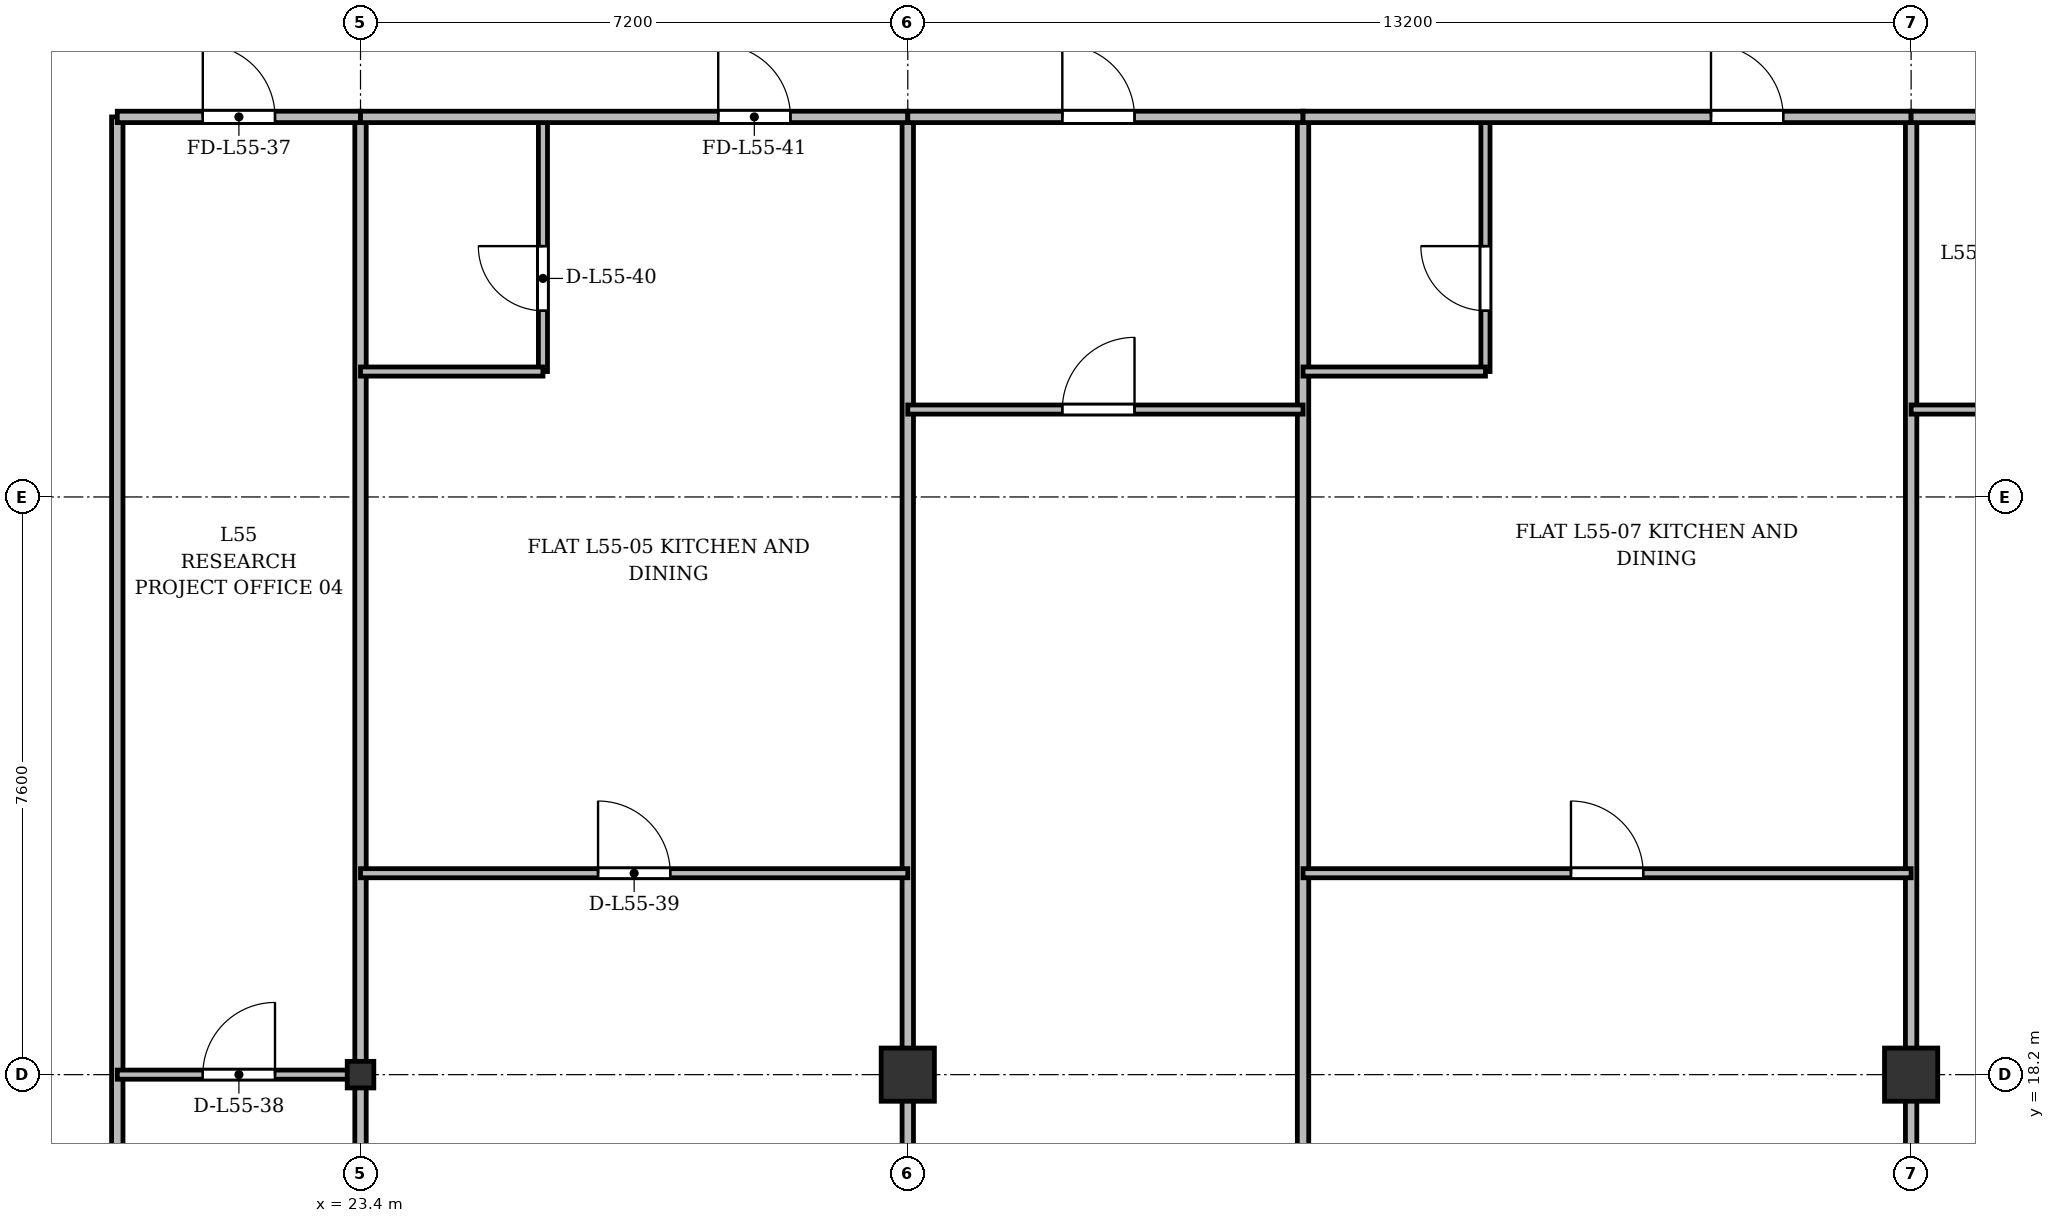
"""IFC4 building model, lengths in metres.
Left out: names, types, materials, properties, quantities, classifications, styles, units other than length and angle.
Written with IfcOpenShell. Run it as: python <this file> out.ifc"""

import sys

from ifc_helpers import new_model, si_unit, direction, frame, frame_2d, origin, origin_2d, place, context, subcontext, project, spatial, rectangle, i_section, extrude, source, transform, mapped, element, fill, save


model = new_model("IFC4")
c1 = context("Model", 3, precision=1e-05, world=origin(), true_north=direction((0.0, 1.0)))
c2 = subcontext(c1, "Body", "Model", "MODEL_VIEW")
j1 = project(units=[si_unit("LENGTHUNIT", "METRE"), si_unit("PLANEANGLEUNIT", "RADIAN")], contexts=[c1])
p1 = place(None, origin())
s1 = spatial("IfcSite", under=j1, at=p1, CompositionType="ELEMENT")
p2 = place(p1, origin())
s2 = spatial("IfcBuilding", under=s1, at=p2, CompositionType="ELEMENT")
p3 = place(p2, frame((0.0, 0.0, 212.1)))
s3 = spatial("IfcBuildingStorey", under=s2, at=p3, CompositionType="ELEMENT", Elevation=212.1)
m1 = source(origin(), c2, "Body", "SweptSolid", [
    extrude(i_section(OverallWidth=0.35, OverallDepth=0.35, WebThickness=0.018, FlangeThickness=0.028, at=origin_2d()), origin(), (0.0, 0.0, 1.0), 3.6),
])
p4 = place(p3, frame((23.4, 18.2, 0.0), z_axis=(0.0, 0.0, 1.0), x_axis=(1.0, 0.0, 0.0)))
e1 = element("IfcColumn", 1, at=p4, inside=s3, PredefinedType="COLUMN", context=c2, shape_type="MappedRepresentation", body=[
    mapped(m1, transform((0.0, 0.0, 0.0), x_axis=(1.0, 0.0, 0.0), y_axis=(0.0, 1.0, 0.0), z_axis=(0.0, 0.0, 1.0), scale=1.0)),
])
m2 = source(origin(), c2, "Body", "SweptSolid", [
    extrude(rectangle(XDim=0.7, YDim=0.7, at=origin_2d()), origin(), (0.0, 0.0, 1.0), 3.6),
])
for number, where, z_axis, x_axis in (
    (2, (30.6, 18.2, 0.0), (0.0, 0.0, 1.0), (1.0, 0.0, 0.0)),
    (3, (43.8, 18.2, 0.0), (0.0, 0.0, 1.0), (1.0, 0.0, 0.0)),
):
    element("IfcColumn", number, at=place(p3, frame(where, z_axis=z_axis, x_axis=x_axis)), inside=s3, PredefinedType="COLUMN", context=c2, shape_type="MappedRepresentation", body=[
        mapped(m2, transform((0.0, 0.0, 0.0), x_axis=(1.0, 0.0, 0.0), y_axis=(0.0, 1.0, 0.0), z_axis=(0.0, 0.0, 1.0), scale=1.0)),
    ])
for number, where, z_axis, x_axis in (
    (4, (23.4, 3.625, 0.0), (0.0, 0.0, 1.0), (0.0, 1.0, 0.0)),
    (5, (30.6, 3.625, 0.0), (0.0, 0.0, 1.0), (0.0, 1.0, 0.0)),
):
    element("IfcWall", number, at=place(p3, frame(where, z_axis=z_axis, x_axis=x_axis)), inside=s3, PredefinedType="PARTITIONING", context=c2, shape_type="SweptSolid", body=[
        extrude(rectangle(XDim=27.175, YDim=0.15, at=frame_2d((13.587, 0.0))), origin(), (0.0, 0.0, 1.0), 2.86),
    ])
p5 = place(p3, frame((35.8, 3.625, 0.0), z_axis=(0.0, 0.0, 1.0), x_axis=(0.0, 1.0, 0.0)))
e6 = element("IfcWall", 6, at=p5, inside=s3, PredefinedType="PARTITIONING", context=c2, shape_type="SweptSolid", body=[
    extrude(rectangle(XDim=27.175, YDim=0.15, at=frame_2d((13.587, 0.0))), origin(), (0.0, 0.0, 1.0), 2.91),
])
p6 = place(p3, frame((43.8, 3.625, 0.0), z_axis=(0.0, 0.0, 1.0), x_axis=(0.0, 1.0, 0.0)))
e7 = element("IfcWall", 7, at=p6, inside=s3, PredefinedType="PARTITIONING", context=c2, shape_type="SweptSolid", body=[
    extrude(rectangle(XDim=27.175, YDim=0.15, at=frame_2d((13.587, 0.0))), origin(), (0.0, 0.0, 1.0), 2.86),
])
p7 = place(p3, frame((20.2, 3.625, 0.0), z_axis=(0.0, 0.0, 1.0), x_axis=(0.0, 1.0, 0.0)))
e8 = element("IfcWall", 8, at=p7, inside=s3, PredefinedType="PARTITIONING", context=c2, shape_type="SweptSolid", body=[
    extrude(rectangle(XDim=27.175, YDim=0.15, at=frame_2d((13.587, 0.0))), origin(), (0.0, 0.0, 1.0), 2.91),
])
p8 = place(p3, frame((20.2, 30.8, 0.0), z_axis=(0.0, 0.0, 1.0), x_axis=(1.0, 0.0, 0.0)))
e9 = element("IfcWall", 9, at=p8, inside=s3, PredefinedType="PARTITIONING", context=c2, shape_type="SweptSolid", body=[
    extrude(rectangle(XDim=3.2, YDim=0.15, at=frame_2d((1.6, 0.0))), origin(), (0.0, 0.0, 1.0), 2.86),
])
p9 = place(p8, frame((1.125, 0.0, 0.0)))
e10 = element("IfcOpeningElement", 10, at=p9, cuts=e9, PredefinedType="OPENING", context=c2, shape_type="SweptSolid", body=[
    extrude(rectangle(XDim=0.95, YDim=2.15, at=frame_2d((0.475, 1.075))), frame((0.0, 0.085, 0.0), z_axis=(0.0, -1.0, 0.0), x_axis=(1.0, 0.0, 0.0)), (0.0, 0.0, 1.0), 0.17),
])
p10 = place(p3, frame((20.2, 18.2, 0.0), z_axis=(0.0, 0.0, 1.0), x_axis=(1.0, 0.0, 0.0)))
e11 = element("IfcWall", 11, at=p10, inside=s3, PredefinedType="PARTITIONING", context=c2, shape_type="SweptSolid", body=[
    extrude(rectangle(XDim=3.2, YDim=0.12, at=frame_2d((1.6, 0.0))), origin(), (0.0, 0.0, 1.0), 2.91),
])
p11 = place(p10, frame((1.125, 0.0, 0.0)))
e12 = element("IfcOpeningElement", 12, at=p11, cuts=e11, PredefinedType="OPENING", context=c2, shape_type="SweptSolid", body=[
    extrude(rectangle(XDim=0.95, YDim=2.15, at=frame_2d((0.475, 1.075))), frame((0.0, 0.07, 0.0), z_axis=(0.0, -1.0, 0.0), x_axis=(1.0, 0.0, 0.0)), (0.0, 0.0, 1.0), 0.14),
])
p12 = place(p3, frame((23.4, 20.85, 0.0), z_axis=(0.0, 0.0, 1.0), x_axis=(1.0, 0.0, 0.0)))
e13 = element("IfcWall", 13, at=p12, inside=s3, PredefinedType="PARTITIONING", context=c2, shape_type="SweptSolid", body=[
    extrude(rectangle(XDim=7.2, YDim=0.12, at=frame_2d((3.6, 0.0))), origin(), (0.0, 0.0, 1.0), 2.86),
])
p13 = place(p12, frame((3.125, 0.0, 0.0)))
e14 = element("IfcOpeningElement", 14, at=p13, cuts=e13, PredefinedType="OPENING", context=c2, shape_type="SweptSolid", body=[
    extrude(rectangle(XDim=0.95, YDim=2.15, at=frame_2d((0.475, 1.075))), frame((0.0, 0.07, 0.0), z_axis=(0.0, -1.0, 0.0), x_axis=(1.0, 0.0, 0.0)), (0.0, 0.0, 1.0), 0.14),
])
p14 = place(p3, frame((25.8, 27.45, 0.0), z_axis=(0.0, 0.0, 1.0), x_axis=(0.0, 1.0, 0.0)))
e15 = element("IfcWall", 15, at=p14, inside=s3, PredefinedType="PARTITIONING", context=c2, shape_type="SweptSolid", body=[
    extrude(rectangle(XDim=3.35, YDim=0.12, at=frame_2d((1.675, 0.0))), origin(), (0.0, 0.0, 1.0), 3.36),
])
p15 = place(p14, frame((0.8, 0.0, 0.0)))
e16 = element("IfcOpeningElement", 16, at=p15, cuts=e15, PredefinedType="OPENING", context=c2, shape_type="SweptSolid", body=[
    extrude(rectangle(XDim=0.85, YDim=2.1, at=frame_2d((0.425, 1.05))), frame((0.0, 0.07, 0.0), z_axis=(0.0, -1.0, 0.0), x_axis=(1.0, 0.0, 0.0)), (0.0, 0.0, 1.0), 0.14),
])
p16 = place(p3, frame((23.4, 27.45, 0.0), z_axis=(0.0, 0.0, 1.0), x_axis=(1.0, 0.0, 0.0)))
e17 = element("IfcWall", 17, at=p16, inside=s3, PredefinedType="PARTITIONING", context=c2, shape_type="SweptSolid", body=[
    extrude(rectangle(XDim=2.4, YDim=0.12, at=frame_2d((1.2, 0.0))), origin(), (0.0, 0.0, 1.0), 2.86),
])
p17 = place(p3, frame((23.4, 30.8, 0.0), z_axis=(0.0, 0.0, 1.0), x_axis=(1.0, 0.0, 0.0)))
e18 = element("IfcWall", 18, at=p17, inside=s3, PredefinedType="PARTITIONING", context=c2, shape_type="SweptSolid", body=[
    extrude(rectangle(XDim=7.2, YDim=0.15, at=frame_2d((3.6, 0.0))), origin(), (0.0, 0.0, 1.0), 2.86),
])
p18 = place(p17, frame((4.706, 0.0, 0.0)))
e19 = element("IfcOpeningElement", 19, at=p18, cuts=e18, PredefinedType="OPENING", context=c2, shape_type="SweptSolid", body=[
    extrude(rectangle(XDim=0.95, YDim=2.15, at=frame_2d((0.475, 1.075))), frame((0.0, 0.085, 0.0), z_axis=(0.0, -1.0, 0.0), x_axis=(1.0, 0.0, 0.0)), (0.0, 0.0, 1.0), 0.17),
])
p19 = place(p3, frame((30.6, 30.8, 0.0), z_axis=(0.0, 0.0, 1.0), x_axis=(1.0, 0.0, 0.0)))
e20 = element("IfcWall", 20, at=p19, inside=s3, PredefinedType="PARTITIONING", context=c2, shape_type="SweptSolid", body=[
    extrude(rectangle(XDim=5.2, YDim=0.15, at=frame_2d((2.6, 0.0))), origin(), (0.0, 0.0, 1.0), 2.86),
])
p20 = place(p19, frame((2.033, 0.0, 0.0)))
e21 = element("IfcOpeningElement", 21, at=p20, cuts=e20, PredefinedType="OPENING", context=c2, shape_type="SweptSolid", body=[
    extrude(rectangle(XDim=0.95, YDim=2.15, at=frame_2d((0.475, 1.075))), frame((0.0, 0.085, 0.0), z_axis=(0.0, -1.0, 0.0), x_axis=(1.0, 0.0, 0.0)), (0.0, 0.0, 1.0), 0.17),
])
p21 = place(p3, frame((30.6, 26.95, 0.0), z_axis=(0.0, 0.0, 1.0), x_axis=(1.0, 0.0, 0.0)))
e22 = element("IfcWall", 22, at=p21, inside=s3, PredefinedType="PARTITIONING", context=c2, shape_type="SweptSolid", body=[
    extrude(rectangle(XDim=5.2, YDim=0.12, at=frame_2d((2.6, 0.0))), origin(), (0.0, 0.0, 1.0), 2.86),
])
p22 = place(p21, frame((2.033, 0.0, 0.0)))
e23 = element("IfcOpeningElement", 23, at=p22, cuts=e22, PredefinedType="OPENING", context=c2, shape_type="SweptSolid", body=[
    extrude(rectangle(XDim=0.95, YDim=2.15, at=frame_2d((0.475, 1.075))), frame((0.0, 0.07, 0.0), z_axis=(0.0, -1.0, 0.0), x_axis=(1.0, 0.0, 0.0)), (0.0, 0.0, 1.0), 0.14),
])
p23 = place(p3, frame((35.8, 20.85, 0.0), z_axis=(0.0, 0.0, 1.0), x_axis=(1.0, 0.0, 0.0)))
e24 = element("IfcWall", 24, at=p23, inside=s3, PredefinedType="PARTITIONING", context=c2, shape_type="SweptSolid", body=[
    extrude(rectangle(XDim=8.0, YDim=0.12, at=frame_2d((4.0, 0.0))), origin(), (0.0, 0.0, 1.0), 2.86),
])
p24 = place(p23, frame((3.525, 0.0, 0.0)))
e25 = element("IfcOpeningElement", 25, at=p24, cuts=e24, PredefinedType="OPENING", context=c2, shape_type="SweptSolid", body=[
    extrude(rectangle(XDim=0.95, YDim=2.15, at=frame_2d((0.475, 1.075))), frame((0.0, 0.07, 0.0), z_axis=(0.0, -1.0, 0.0), x_axis=(1.0, 0.0, 0.0)), (0.0, 0.0, 1.0), 0.14),
])
p25 = place(p3, frame((38.2, 27.45, 0.0), z_axis=(0.0, 0.0, 1.0), x_axis=(0.0, 1.0, 0.0)))
e26 = element("IfcWall", 26, at=p25, inside=s3, PredefinedType="PARTITIONING", context=c2, shape_type="SweptSolid", body=[
    extrude(rectangle(XDim=3.35, YDim=0.12, at=frame_2d((1.675, 0.0))), origin(), (0.0, 0.0, 1.0), 3.36),
])
p26 = place(p25, frame((0.8, 0.0, 0.0)))
e27 = element("IfcOpeningElement", 27, at=p26, cuts=e26, PredefinedType="OPENING", context=c2, shape_type="SweptSolid", body=[
    extrude(rectangle(XDim=0.85, YDim=2.1, at=frame_2d((0.425, 1.05))), frame((0.0, 0.07, 0.0), z_axis=(0.0, -1.0, 0.0), x_axis=(1.0, 0.0, 0.0)), (0.0, 0.0, 1.0), 0.14),
])
p27 = place(p3, frame((35.8, 27.45, 0.0), z_axis=(0.0, 0.0, 1.0), x_axis=(1.0, 0.0, 0.0)))
e28 = element("IfcWall", 28, at=p27, inside=s3, PredefinedType="PARTITIONING", context=c2, shape_type="SweptSolid", body=[
    extrude(rectangle(XDim=2.4, YDim=0.12, at=frame_2d((1.2, 0.0))), origin(), (0.0, 0.0, 1.0), 3.36),
])
p28 = place(p3, frame((35.8, 30.8, 0.0), z_axis=(0.0, 0.0, 1.0), x_axis=(1.0, 0.0, 0.0)))
e29 = element("IfcWall", 29, at=p28, inside=s3, PredefinedType="PARTITIONING", context=c2, shape_type="SweptSolid", body=[
    extrude(rectangle(XDim=8.0, YDim=0.15, at=frame_2d((4.0, 0.0))), origin(), (0.0, 0.0, 1.0), 2.86),
])
p29 = place(p28, frame((5.367, 0.0, 0.0)))
e30 = element("IfcOpeningElement", 30, at=p29, cuts=e29, PredefinedType="OPENING", context=c2, shape_type="SweptSolid", body=[
    extrude(rectangle(XDim=0.95, YDim=2.15, at=frame_2d((0.475, 1.075))), frame((0.0, 0.085, 0.0), z_axis=(0.0, -1.0, 0.0), x_axis=(1.0, 0.0, 0.0)), (0.0, 0.0, 1.0), 0.17),
])
p30 = place(p3, frame((43.8, 30.8, 0.0), z_axis=(0.0, 0.0, 1.0), x_axis=(1.0, 0.0, 0.0)))
e31 = element("IfcWall", 31, at=p30, inside=s3, PredefinedType="PARTITIONING", context=c2, shape_type="SweptSolid", body=[
    extrude(rectangle(XDim=7.2, YDim=0.15, at=frame_2d((3.6, 0.0))), origin(), (0.0, 0.0, 1.0), 2.86),
])
p31 = place(p30, frame((3.125, 0.0, 0.0)))
e32 = element("IfcOpeningElement", 32, at=p31, cuts=e31, PredefinedType="OPENING", context=c2, shape_type="SweptSolid", body=[
    extrude(rectangle(XDim=0.95, YDim=2.15, at=frame_2d((0.475, 1.075))), frame((0.0, 0.085, 0.0), z_axis=(0.0, -1.0, 0.0), x_axis=(1.0, 0.0, 0.0)), (0.0, 0.0, 1.0), 0.17),
])
p32 = place(p3, frame((43.8, 26.95, 0.0), z_axis=(0.0, 0.0, 1.0), x_axis=(1.0, 0.0, 0.0)))
e33 = element("IfcWall", 33, at=p32, inside=s3, PredefinedType="PARTITIONING", context=c2, shape_type="SweptSolid", body=[
    extrude(rectangle(XDim=7.2, YDim=0.12, at=frame_2d((3.6, 0.0))), origin(), (0.0, 0.0, 1.0), 2.86),
])
p33 = place(p32, frame((3.125, 0.0, 0.0)))
e34 = element("IfcOpeningElement", 34, at=p33, cuts=e33, PredefinedType="OPENING", context=c2, shape_type="SweptSolid", body=[
    extrude(rectangle(XDim=0.95, YDim=2.15, at=frame_2d((0.475, 1.075))), frame((0.0, 0.07, 0.0), z_axis=(0.0, -1.0, 0.0), x_axis=(1.0, 0.0, 0.0)), (0.0, 0.0, 1.0), 0.14),
])
m3 = source(origin(), c2, "Body", "SweptSolid", [
    extrude(rectangle(XDim=0.95, YDim=2.15, at=frame_2d((0.475, 1.075))), frame((0.0, 0.025, 0.0), z_axis=(0.0, -1.0, 0.0), x_axis=(1.0, 0.0, 0.0)), (0.0, 0.0, 1.0), 0.05),
])
p34 = place(p9, origin())
e35 = element("IfcDoor", 35, at=p34, inside=s3, OperationType="SINGLE_SWING_LEFT", PredefinedType="DOOR", context=c2, shape_type="MappedRepresentation", body=[
    mapped(m3, transform((0.0, 0.0, 0.0), x_axis=(1.0, 0.0, 0.0), y_axis=(0.0, 1.0, 0.0), z_axis=(0.0, 0.0, 1.0), scale=1.0)),
])
fill(e10, e35)
p35 = place(p11, origin())
e36 = element("IfcDoor", 36, at=p35, inside=s3, OperationType="SINGLE_SWING_RIGHT", PredefinedType="DOOR", context=c2, shape_type="MappedRepresentation", body=[
    mapped(m3, transform((0.0, 0.0, 0.0), x_axis=(1.0, 0.0, 0.0), y_axis=(0.0, 1.0, 0.0), z_axis=(0.0, 0.0, 1.0), scale=1.0)),
])
fill(e12, e36)
p36 = place(p13, origin())
e37 = element("IfcDoor", 37, at=p36, inside=s3, OperationType="SINGLE_SWING_LEFT", PredefinedType="DOOR", context=c2, shape_type="MappedRepresentation", body=[
    mapped(m3, transform((0.0, 0.0, 0.0), x_axis=(1.0, 0.0, 0.0), y_axis=(0.0, 1.0, 0.0), z_axis=(0.0, 0.0, 1.0), scale=1.0)),
])
fill(e14, e37)
m4 = source(origin(), c2, "Body", "SweptSolid", [
    extrude(rectangle(XDim=0.85, YDim=2.1, at=frame_2d((0.425, 1.05))), frame((0.0, 0.025, 0.0), z_axis=(0.0, -1.0, 0.0), x_axis=(1.0, 0.0, 0.0)), (0.0, 0.0, 1.0), 0.05),
])
p37 = place(p15, origin())
e38 = element("IfcDoor", 38, at=p37, inside=s3, OperationType="SINGLE_SWING_RIGHT", PredefinedType="DOOR", context=c2, shape_type="MappedRepresentation", body=[
    mapped(m4, transform((0.0, 0.0, 0.0), x_axis=(1.0, 0.0, 0.0), y_axis=(0.0, 1.0, 0.0), z_axis=(0.0, 0.0, 1.0), scale=1.0)),
])
fill(e16, e38)
p38 = place(p18, origin())
e39 = element("IfcDoor", 39, at=p38, inside=s3, OperationType="SINGLE_SWING_LEFT", PredefinedType="DOOR", context=c2, shape_type="MappedRepresentation", body=[
    mapped(m3, transform((0.0, 0.0, 0.0), x_axis=(1.0, 0.0, 0.0), y_axis=(0.0, 1.0, 0.0), z_axis=(0.0, 0.0, 1.0), scale=1.0)),
])
fill(e19, e39)
p39 = place(p20, origin())
e40 = element("IfcDoor", 40, at=p39, inside=s3, OperationType="SINGLE_SWING_LEFT", PredefinedType="DOOR", context=c2, shape_type="MappedRepresentation", body=[
    mapped(m3, transform((0.0, 0.0, 0.0), x_axis=(1.0, 0.0, 0.0), y_axis=(0.0, 1.0, 0.0), z_axis=(0.0, 0.0, 1.0), scale=1.0)),
])
fill(e21, e40)
p40 = place(p22, origin())
e41 = element("IfcDoor", 41, at=p40, inside=s3, OperationType="SINGLE_SWING_RIGHT", PredefinedType="DOOR", context=c2, shape_type="MappedRepresentation", body=[
    mapped(m3, transform((0.0, 0.0, 0.0), x_axis=(1.0, 0.0, 0.0), y_axis=(0.0, 1.0, 0.0), z_axis=(0.0, 0.0, 1.0), scale=1.0)),
])
fill(e23, e41)
p41 = place(p24, origin())
e42 = element("IfcDoor", 42, at=p41, inside=s3, OperationType="SINGLE_SWING_LEFT", PredefinedType="DOOR", context=c2, shape_type="MappedRepresentation", body=[
    mapped(m3, transform((0.0, 0.0, 0.0), x_axis=(1.0, 0.0, 0.0), y_axis=(0.0, 1.0, 0.0), z_axis=(0.0, 0.0, 1.0), scale=1.0)),
])
fill(e25, e42)
p42 = place(p26, origin())
e43 = element("IfcDoor", 43, at=p42, inside=s3, OperationType="SINGLE_SWING_RIGHT", PredefinedType="DOOR", context=c2, shape_type="MappedRepresentation", body=[
    mapped(m4, transform((0.0, 0.0, 0.0), x_axis=(1.0, 0.0, 0.0), y_axis=(0.0, 1.0, 0.0), z_axis=(0.0, 0.0, 1.0), scale=1.0)),
])
fill(e27, e43)
p43 = place(p29, origin())
e44 = element("IfcDoor", 44, at=p43, inside=s3, OperationType="SINGLE_SWING_LEFT", PredefinedType="DOOR", context=c2, shape_type="MappedRepresentation", body=[
    mapped(m3, transform((0.0, 0.0, 0.0), x_axis=(1.0, 0.0, 0.0), y_axis=(0.0, 1.0, 0.0), z_axis=(0.0, 0.0, 1.0), scale=1.0)),
])
fill(e30, e44)
save(model, sys.argv[1])
